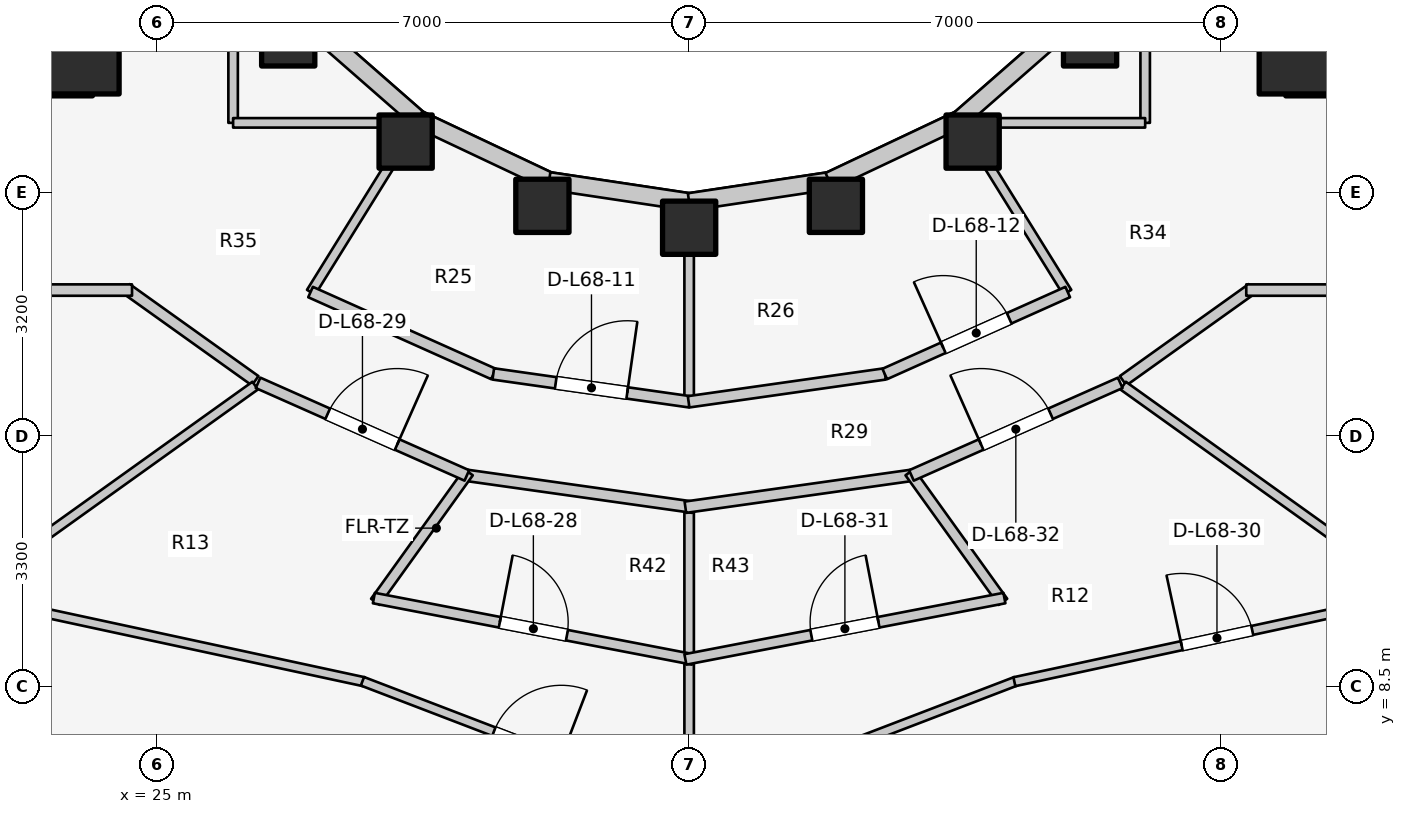
"""IFC4 building model, lengths in metres.
Left out: names, types, materials, properties, quantities, classifications, styles, units other than length and angle.
Written with IfcOpenShell. Run it as: python <this file> out.ifc"""

import sys

from ifc_helpers import new_model, si_unit, direction, frame, frame_2d, origin, origin_2d, place, context, subcontext, project, spatial, rectangle, extrude, element, fill, save


model = new_model("IFC4")
c1 = context("Model", 3, precision=1e-05, world=origin(), true_north=direction((0.0, 1.0)))
c2 = subcontext(c1, "Body", "Model", "MODEL_VIEW")
j1 = project(units=[si_unit("LENGTHUNIT", "METRE"), si_unit("PLANEANGLEUNIT", "RADIAN")], contexts=[c1])
p1 = place(None, origin())
s1 = spatial("IfcSite", under=j1, at=p1, CompositionType="ELEMENT")
p2 = place(p1, origin())
s2 = spatial("IfcBuilding", under=s1, at=p2, CompositionType="ELEMENT")
p3 = place(p2, frame((0.0, 0.0, 223.3)))
s3 = spatial("IfcBuildingStorey", under=s2, at=p3, CompositionType="ELEMENT", Elevation=223.3)
for number, where, z_axis, x_axis in (
    (1, (19.65, 16.55, 0.0), (0.0, 0.0, 1.0), (1.0, 0.0, 0.0)),
    (2, (39.85, 16.55, 0.0), (0.0, 0.0, 1.0), (1.0, 0.0, 0.0)),
):
    element("IfcWall", number, at=place(p3, frame(where, z_axis=z_axis, x_axis=x_axis)), inside=s3, PredefinedType="SHEAR", context=c2, shape_type="SweptSolid", body=[
        extrude(rectangle(XDim=4.5, YDim=0.55, at=frame_2d((2.25, 0.0))), origin(), (0.0, 0.0, 1.0), 3.1),
    ])
for number, where, z_axis, x_axis in (
    (3, (23.9, 16.9, 0.0), (0.0, 0.0, 1.0), (1.0, 0.0, 0.0)),
    (4, (40.1, 16.9, 0.0), (0.0, 0.0, 1.0), (1.0, 0.0, 0.0)),
):
    element("IfcColumn", number, at=place(p3, frame(where, z_axis=z_axis, x_axis=x_axis)), inside=s3, PredefinedType="COLUMN", context=c2, shape_type="SweptSolid", body=[
        extrude(rectangle(XDim=1.2, YDim=1.2, at=origin_2d()), origin(), (0.0, 0.0, 1.0), 3.1),
    ])
for number, where, z_axis, x_axis in (
    (5, (26.725, 17.018, 0.0), (0.0, 0.0, 1.0), (1.0, 0.0, 0.0)),
    (6, (28.27, 15.673, 0.0), (0.0, 0.0, 1.0), (1.0, 0.0, 0.0)),
    (7, (30.069, 14.828, 0.0), (0.0, 0.0, 1.0), (1.0, 0.0, 0.0)),
    (8, (32.0, 14.54, 0.0), (0.0, 0.0, 1.0), (1.0, 0.0, 0.0)),
    (9, (33.931, 14.828, 0.0), (0.0, 0.0, 1.0), (1.0, 0.0, 0.0)),
    (10, (35.73, 15.673, 0.0), (0.0, 0.0, 1.0), (1.0, 0.0, 0.0)),
    (11, (37.275, 17.018, 0.0), (0.0, 0.0, 1.0), (1.0, 0.0, 0.0)),
):
    element("IfcColumn", number, at=place(p3, frame(where, z_axis=z_axis, x_axis=x_axis)), inside=s3, PredefinedType="COLUMN", context=c2, shape_type="SweptSolid", body=[
        extrude(rectangle(XDim=0.7, YDim=0.7, at=origin_2d()), origin(), (0.0, 0.0, 1.0), 3.1),
    ])
p4 = place(p3, frame((26.965, 17.258, 0.0), z_axis=(0.0, 0.0, 1.0), x_axis=(0.752576694707, -0.658504607869, 0.0)))
e12 = element("IfcWall", 12, at=p4, inside=s3, PredefinedType="STANDARD", context=c2, shape_type="SweptSolid", body=[
    extrude(rectangle(XDim=1.959, YDim=0.23, at=frame_2d((0.98, 0.0))), origin(), (0.0, 0.0, 1.0), 2.16),
])
p5 = place(p3, frame((28.44, 15.968, 0.0), z_axis=(0.0, 0.0, 1.0), x_axis=(0.904179699603, -0.427152280606, 0.0)))
e13 = element("IfcWall", 13, at=p5, inside=s3, PredefinedType="STANDARD", context=c2, shape_type="SweptSolid", body=[
    extrude(rectangle(XDim=1.899, YDim=0.23, at=frame_2d((0.95, 0.0))), origin(), (0.0, 0.0, 1.0), 2.16),
])
for number, where, z_axis, x_axis in (
    (14, (30.157, 15.157, 0.0), (0.0, 0.0, 1.0), (0.989, -0.149, 0.0)),
    (15, (32.0, 14.88, 0.0), (0.0, 0.0, 1.0), (0.989, 0.149, 0.0)),
):
    element("IfcWall", number, at=place(p3, frame(where, z_axis=z_axis, x_axis=x_axis)), inside=s3, PredefinedType="STANDARD", context=c2, shape_type="SweptSolid", body=[
        extrude(rectangle(XDim=1.864, YDim=0.23, at=frame_2d((0.932, 0.0))), origin(), (0.0, 0.0, 1.0), 2.16),
    ])
p6 = place(p3, frame((33.843, 15.157, 0.0), z_axis=(0.0, 0.0, 1.0), x_axis=(0.904179699603, 0.427152280606, 0.0)))
e16 = element("IfcWall", 16, at=p6, inside=s3, PredefinedType="STANDARD", context=c2, shape_type="SweptSolid", body=[
    extrude(rectangle(XDim=1.899, YDim=0.23, at=frame_2d((0.95, 0.0))), origin(), (0.0, 0.0, 1.0), 2.16),
])
p7 = place(p3, frame((35.56, 15.968, 0.0), z_axis=(0.0, 0.0, 1.0), x_axis=(0.752576694707, 0.658504607869, 0.0)))
e17 = element("IfcWall", 17, at=p7, inside=s3, PredefinedType="STANDARD", context=c2, shape_type="SweptSolid", body=[
    extrude(rectangle(XDim=1.959, YDim=0.23, at=frame_2d((0.98, 0.0))), origin(), (0.0, 0.0, 1.0), 2.16),
])
p8 = place(p3, frame((28.45, 15.985, 0.0), z_axis=(0.0, 0.0, 1.0), x_axis=(-0.527527080983, -0.849538215049, 0.0)))
e18 = element("IfcWall", 18, at=p8, inside=s3, PredefinedType="PARTITIONING", context=c2, shape_type="SweptSolid", body=[
    extrude(rectangle(XDim=2.701, YDim=0.125, at=frame_2d((1.351, 0.0))), origin(), (0.0, 0.0, 1.0), 2.376),
])
p9 = place(p3, frame((32.0, 14.9, 0.0), z_axis=(0.0, 0.0, 1.0), x_axis=(0.0, -1.0, 0.0)))
e19 = element("IfcWall", 19, at=p9, inside=s3, PredefinedType="PARTITIONING", context=c2, shape_type="SweptSolid", body=[
    extrude(rectangle(XDim=2.65, YDim=0.125, at=frame_2d((1.325, 0.0))), origin(), (0.0, 0.0, 1.0), 2.376),
])
p10 = place(p3, frame((35.55, 15.985, 0.0), z_axis=(0.0, 0.0, 1.0), x_axis=(0.527527080983, -0.849538215049, 0.0)))
e20 = element("IfcWall", 20, at=p10, inside=s3, PredefinedType="PARTITIONING", context=c2, shape_type="SweptSolid", body=[
    extrude(rectangle(XDim=2.701, YDim=0.125, at=frame_2d((1.351, 0.0))), origin(), (0.0, 0.0, 1.0), 2.376),
])
p11 = place(p3, frame((27.019, 13.694, 0.0), z_axis=(0.0, 0.0, 1.0), x_axis=(0.912628408652, -0.408790151203, 0.0)))
e21 = element("IfcWall", 21, at=p11, inside=s3, PredefinedType="PARTITIONING", context=c2, shape_type="SweptSolid", body=[
    extrude(rectangle(XDim=2.638, YDim=0.15, at=frame_2d((1.319, 0.0))), origin(), (0.0, 0.0, 1.0), 2.376),
])
p12 = place(p3, frame((29.423, 12.617, 0.0), z_axis=(0.0, 0.0, 1.0), x_axis=(0.990078185178, -0.140517569133, 0.0)))
e22 = element("IfcWall", 22, at=p12, inside=s3, PredefinedType="PARTITIONING", context=c2, shape_type="SweptSolid", body=[
    extrude(rectangle(XDim=2.61, YDim=0.15, at=frame_2d((1.305, 0.0))), origin(), (0.0, 0.0, 1.0), 2.376),
])
p13 = place(p12, frame((0.83, 0.0, 0.0)))
e23 = element("IfcOpeningElement", 23, at=p13, cuts=e22, PredefinedType="OPENING", context=c2, shape_type="SweptSolid", body=[
    extrude(rectangle(XDim=0.95, YDim=2.1, at=frame_2d((0.475, 1.05))), frame((0.0, 0.085, 0.0), z_axis=(0.0, -1.0, 0.0), x_axis=(1.0, 0.0, 0.0)), (0.0, 0.0, 1.0), 0.17),
])
p14 = place(p3, frame((31.993, 12.25, 0.0), z_axis=(0.0, 0.0, 1.0), x_axis=(0.990078185178, 0.140517569133, 0.0)))
e24 = element("IfcWall", 24, at=p14, inside=s3, PredefinedType="PARTITIONING", context=c2, shape_type="SweptSolid", body=[
    extrude(rectangle(XDim=2.61, YDim=0.15, at=frame_2d((1.305, 0.0))), origin(), (0.0, 0.0, 1.0), 2.376),
])
p15 = place(p3, frame((34.573, 12.616, 0.0), z_axis=(0.0, 0.0, 1.0), x_axis=(0.912628408652, 0.408790151203, 0.0)))
e25 = element("IfcWall", 25, at=p15, inside=s3, PredefinedType="PARTITIONING", context=c2, shape_type="SweptSolid", body=[
    extrude(rectangle(XDim=2.638, YDim=0.15, at=frame_2d((1.319, 0.0))), origin(), (0.0, 0.0, 1.0), 2.376),
])
p16 = place(p15, frame((0.844, 0.0, 0.0)))
e26 = element("IfcOpeningElement", 26, at=p16, cuts=e25, PredefinedType="OPENING", context=c2, shape_type="SweptSolid", body=[
    extrude(rectangle(XDim=0.95, YDim=2.1, at=frame_2d((0.475, 1.05))), frame((0.0, 0.085, 0.0), z_axis=(0.0, -1.0, 0.0), x_axis=(1.0, 0.0, 0.0)), (0.0, 0.0, 1.0), 0.17),
])
p17 = place(p3, frame((26.0, 15.92, 0.0), z_axis=(0.0, 0.0, 1.0), x_axis=(0.0, 1.0, 0.0)))
e27 = element("IfcWall", 27, at=p17, inside=s3, PredefinedType="PARTITIONING", context=c2, shape_type="SweptSolid", body=[
    extrude(rectangle(XDim=4.28, YDim=0.125, at=frame_2d((2.14, 0.0))), origin(), (0.0, 0.0, 1.0), 2.232),
])
p18 = place(p3, frame((26.0, 15.92, 0.0), z_axis=(0.0, 0.0, 1.0), x_axis=(1.0, 0.0, 0.0)))
e28 = element("IfcWall", 28, at=p18, inside=s3, PredefinedType="PARTITIONING", context=c2, shape_type="SweptSolid", body=[
    extrude(rectangle(XDim=2.6, YDim=0.125, at=frame_2d((1.3, 0.0))), origin(), (0.0, 0.0, 1.0), 2.232),
])
p19 = place(p3, frame((38.0, 15.92, 0.0), z_axis=(0.0, 0.0, 1.0), x_axis=(0.0, 1.0, 0.0)))
e29 = element("IfcWall", 29, at=p19, inside=s3, PredefinedType="PARTITIONING", context=c2, shape_type="SweptSolid", body=[
    extrude(rectangle(XDim=4.28, YDim=0.125, at=frame_2d((2.14, 0.0))), origin(), (0.0, 0.0, 1.0), 2.232),
])
p20 = place(p3, frame((35.4, 15.92, 0.0), z_axis=(0.0, 0.0, 1.0), x_axis=(1.0, 0.0, 0.0)))
e30 = element("IfcWall", 30, at=p20, inside=s3, PredefinedType="PARTITIONING", context=c2, shape_type="SweptSolid", body=[
    extrude(rectangle(XDim=2.6, YDim=0.125, at=frame_2d((1.3, 0.0))), origin(), (0.0, 0.0, 1.0), 2.232),
])
p21 = place(p3, frame((26.29, 12.527, 0.0), z_axis=(0.0, 0.0, 1.0), x_axis=(-0.813780999276, 0.581171648669, 0.0)))
e31 = element("IfcWall", 31, at=p21, inside=s3, PredefinedType="PARTITIONING", context=c2, shape_type="SweptSolid", body=[
    extrude(rectangle(XDim=2.082, YDim=0.15, at=frame_2d((1.041, 0.0))), origin(), (0.0, 0.0, 1.0), 2.376),
])
p22 = place(p3, frame((17.15, 13.72, 0.0), z_axis=(0.0, 0.0, 1.0), x_axis=(1.0, 0.0, 0.0)))
e32 = element("IfcWall", 32, at=p22, inside=s3, PredefinedType="PARTITIONING", context=c2, shape_type="SweptSolid", body=[
    extrude(rectangle(XDim=7.52, YDim=0.15, at=frame_2d((3.76, 0.0))), origin(), (0.0, 0.0, 1.0), 2.376),
])
p23 = place(p22, frame((1.3, 0.0, 0.0)))
e33 = element("IfcOpeningElement", 33, at=p23, cuts=e32, PredefinedType="OPENING", context=c2, shape_type="SweptSolid", body=[
    extrude(rectangle(XDim=0.9, YDim=2.1, at=frame_2d((0.45, 1.05))), frame((0.0, 0.085, 0.0), z_axis=(0.0, -1.0, 0.0), x_axis=(1.0, 0.0, 0.0)), (0.0, 0.0, 1.0), 0.17),
])
p24 = place(p3, frame((37.71, 12.527, 0.0), z_axis=(0.0, 0.0, 1.0), x_axis=(0.813780999276, 0.581171648669, 0.0)))
e34 = element("IfcWall", 34, at=p24, inside=s3, PredefinedType="PARTITIONING", context=c2, shape_type="SweptSolid", body=[
    extrude(rectangle(XDim=2.082, YDim=0.15, at=frame_2d((1.041, 0.0))), origin(), (0.0, 0.0, 1.0), 2.376),
])
p25 = place(p3, frame((39.33, 13.72, 0.0), z_axis=(0.0, 0.0, 1.0), x_axis=(1.0, 0.0, 0.0)))
e35 = element("IfcWall", 35, at=p25, inside=s3, PredefinedType="PARTITIONING", context=c2, shape_type="SweptSolid", body=[
    extrude(rectangle(XDim=7.52, YDim=0.15, at=frame_2d((3.76, 0.0))), origin(), (0.0, 0.0, 1.0), 2.376),
])
p26 = place(p25, frame((5.22, 0.0, 0.0)))
e36 = element("IfcOpeningElement", 36, at=p26, cuts=e35, PredefinedType="OPENING", context=c2, shape_type="SweptSolid", body=[
    extrude(rectangle(XDim=0.9, YDim=2.1, at=frame_2d((0.45, 1.05))), frame((0.0, 0.085, 0.0), z_axis=(0.0, -1.0, 0.0), x_axis=(1.0, 0.0, 0.0)), (0.0, 0.0, 1.0), 0.17),
])
p27 = place(p3, frame((26.29, 12.463, 0.0), z_axis=(0.0, 0.0, 1.0), x_axis=(-0.813163816543, -0.582034885093, 0.0)))
e37 = element("IfcWall", 37, at=p27, inside=s3, PredefinedType="PARTITIONING", context=c2, shape_type="SweptSolid", body=[
    extrude(rectangle(XDim=6.955, YDim=0.125, at=frame_2d((3.477, 0.0))), origin(), (0.0, 0.0, 1.0), 2.376),
])
p28 = place(p3, frame((32.0, 10.815, 0.0), z_axis=(0.0, 0.0, 1.0), x_axis=(0.0, -1.0, 0.0)))
e38 = element("IfcWall", 38, at=p28, inside=s3, PredefinedType="PARTITIONING", context=c2, shape_type="SweptSolid", body=[
    extrude(rectangle(XDim=5.715, YDim=0.125, at=frame_2d((2.857, 0.0))), origin(), (0.0, 0.0, 1.0), 2.376),
])
p29 = place(p3, frame((37.71, 12.463, 0.0), z_axis=(0.0, 0.0, 1.0), x_axis=(0.813163816543, -0.582034885093, 0.0)))
e39 = element("IfcWall", 39, at=p29, inside=s3, PredefinedType="PARTITIONING", context=c2, shape_type="SweptSolid", body=[
    extrude(rectangle(XDim=6.955, YDim=0.125, at=frame_2d((3.477, 0.0))), origin(), (0.0, 0.0, 1.0), 2.376),
])
p30 = place(p3, frame((22.39, 9.717, 0.0), z_axis=(0.0, 0.0, 1.0), x_axis=(0.977534972695, -0.210773283785, 0.0)))
e40 = element("IfcWall", 40, at=p30, inside=s3, PredefinedType="MOVABLE", context=c2, shape_type="SweptSolid", body=[
    extrude(rectangle(XDim=5.453, YDim=0.12, at=frame_2d((2.727, 0.0))), origin(), (0.0, 0.0, 1.0), 2.376),
])
p31 = place(p3, frame((27.702, 8.573, 0.0), z_axis=(0.0, 0.0, 1.0), x_axis=(0.933766866443, -0.357881878744, 0.0)))
e41 = element("IfcWall", 41, at=p31, inside=s3, PredefinedType="MOVABLE", context=c2, shape_type="SweptSolid", body=[
    extrude(rectangle(XDim=4.653, YDim=0.12, at=frame_2d((2.327, 0.0))), origin(), (0.0, 0.0, 1.0), 2.376),
])
p32 = place(p31, frame((1.852, 0.0, 0.0)))
e42 = element("IfcOpeningElement", 42, at=p32, cuts=e41, PredefinedType="OPENING", context=c2, shape_type="SweptSolid", body=[
    extrude(rectangle(XDim=0.95, YDim=2.1, at=frame_2d((0.475, 1.05))), frame((0.0, 0.07, 0.0), z_axis=(0.0, -1.0, 0.0), x_axis=(1.0, 0.0, 0.0)), (0.0, 0.0, 1.0), 0.14),
])
p33 = place(p3, frame((29.018, 11.29, 0.0), z_axis=(0.0, 0.0, 1.0), x_axis=(0.990214091671, -0.13955662885, 0.0)))
e43 = element("IfcWall", 43, at=p33, inside=s3, PredefinedType="PARTITIONING", context=c2, shape_type="SweptSolid", body=[
    extrude(rectangle(XDim=3.062, YDim=0.15, at=frame_2d((1.531, 0.0))), origin(), (0.0, 0.0, 1.0), 2.376),
])
p34 = place(p3, frame((29.097, 11.324, 0.0), z_axis=(0.0, 0.0, 1.0), x_axis=(-0.583259891741, -0.812285601673, 0.0)))
e44 = element("IfcWall", 44, at=p34, inside=s3, PredefinedType="PLUMBINGWALL", context=c2, shape_type="SweptSolid", body=[
    extrude(rectangle(XDim=2.1, YDim=0.14, at=frame_2d((1.05, 0.0))), origin(), (0.0, 0.0, 1.0), 2.385),
])
p35 = place(p3, frame((27.852, 9.668, 0.0), z_axis=(0.0, 0.0, 1.0), x_axis=(0.98198484664, -0.188959680803, 0.0)))
e45 = element("IfcWall", 45, at=p35, inside=s3, PredefinedType="PLUMBINGWALL", context=c2, shape_type="SweptSolid", body=[
    extrude(rectangle(XDim=4.274, YDim=0.14, at=frame_2d((2.137, 0.0))), origin(), (0.0, 0.0, 1.0), 2.376),
])
p36 = place(p35, frame((1.687, 0.0, 0.0)))
e46 = element("IfcOpeningElement", 46, at=p36, cuts=e45, PredefinedType="OPENING", context=c2, shape_type="SweptSolid", body=[
    extrude(rectangle(XDim=0.9, YDim=2.1, at=frame_2d((0.45, 1.05))), frame((0.0, 0.08, 0.0), z_axis=(0.0, -1.0, 0.0), x_axis=(1.0, 0.0, 0.0)), (0.0, 0.0, 1.0), 0.16),
])
p37 = place(p3, frame((26.328, 12.499, 0.0), z_axis=(0.0, 0.0, 1.0), x_axis=(0.914139569865, -0.405399613724, 0.0)))
e47 = element("IfcWall", 47, at=p37, inside=s3, PredefinedType="PARTITIONING", context=c2, shape_type="SweptSolid", body=[
    extrude(rectangle(XDim=3.005, YDim=0.15, at=frame_2d((1.502, 0.0))), origin(), (0.0, 0.0, 1.0), 2.376),
])
p38 = place(p37, frame((1.002, 0.0, 0.0)))
e48 = element("IfcOpeningElement", 48, at=p38, cuts=e47, PredefinedType="OPENING", context=c2, shape_type="SweptSolid", body=[
    extrude(rectangle(XDim=1.0, YDim=2.1, at=frame_2d((0.5, 1.05))), frame((0.0, 0.085, 0.0), z_axis=(0.0, -1.0, 0.0), x_axis=(1.0, 0.0, 0.0)), (0.0, 0.0, 1.0), 0.17),
])
p39 = place(p3, frame((31.953, 6.908, 0.0), z_axis=(0.0, 0.0, 1.0), x_axis=(0.933766866443, 0.357881878744, 0.0)))
e49 = element("IfcWall", 49, at=p39, inside=s3, PredefinedType="MOVABLE", context=c2, shape_type="SweptSolid", body=[
    extrude(rectangle(XDim=4.653, YDim=0.12, at=frame_2d((2.327, 0.0))), origin(), (0.0, 0.0, 1.0), 2.376),
])
p40 = place(p3, frame((36.279, 8.567, 0.0), z_axis=(0.0, 0.0, 1.0), x_axis=(0.977534972695, 0.210773283785, 0.0)))
e50 = element("IfcWall", 50, at=p40, inside=s3, PredefinedType="MOVABLE", context=c2, shape_type="SweptSolid", body=[
    extrude(rectangle(XDim=5.453, YDim=0.12, at=frame_2d((2.727, 0.0))), origin(), (0.0, 0.0, 1.0), 2.376),
])
p41 = place(p40, frame((2.252, 0.0, 0.0)))
e51 = element("IfcOpeningElement", 51, at=p41, cuts=e50, PredefinedType="OPENING", context=c2, shape_type="SweptSolid", body=[
    extrude(rectangle(XDim=0.95, YDim=2.1, at=frame_2d((0.475, 1.05))), frame((0.0, 0.07, 0.0), z_axis=(0.0, -1.0, 0.0), x_axis=(1.0, 0.0, 0.0)), (0.0, 0.0, 1.0), 0.14),
])
p42 = place(p3, frame((31.95, 10.863, 0.0), z_axis=(0.0, 0.0, 1.0), x_axis=(0.990214091671, 0.13955662885, 0.0)))
e52 = element("IfcWall", 52, at=p42, inside=s3, PredefinedType="PARTITIONING", context=c2, shape_type="SweptSolid", body=[
    extrude(rectangle(XDim=3.062, YDim=0.15, at=frame_2d((1.531, 0.0))), origin(), (0.0, 0.0, 1.0), 2.376),
])
p43 = place(p3, frame((34.903, 11.324, 0.0), z_axis=(0.0, 0.0, 1.0), x_axis=(0.583259891741, -0.812285601673, 0.0)))
e53 = element("IfcWall", 53, at=p43, inside=s3, PredefinedType="PLUMBINGWALL", context=c2, shape_type="SweptSolid", body=[
    extrude(rectangle(XDim=2.1, YDim=0.14, at=frame_2d((1.05, 0.0))), origin(), (0.0, 0.0, 1.0), 2.385),
])
p44 = place(p3, frame((31.951, 8.861, 0.0), z_axis=(0.0, 0.0, 1.0), x_axis=(0.98198484664, 0.188959680803, 0.0)))
e54 = element("IfcWall", 54, at=p44, inside=s3, PredefinedType="PLUMBINGWALL", context=c2, shape_type="SweptSolid", body=[
    extrude(rectangle(XDim=4.274, YDim=0.14, at=frame_2d((2.137, 0.0))), origin(), (0.0, 0.0, 1.0), 2.376),
])
p45 = place(p44, frame((1.687, 0.0, 0.0)))
e55 = element("IfcOpeningElement", 55, at=p45, cuts=e54, PredefinedType="OPENING", context=c2, shape_type="SweptSolid", body=[
    extrude(rectangle(XDim=0.9, YDim=2.1, at=frame_2d((0.45, 1.05))), frame((0.0, 0.08, 0.0), z_axis=(0.0, -1.0, 0.0), x_axis=(1.0, 0.0, 0.0)), (0.0, 0.0, 1.0), 0.16),
])
p46 = place(p3, frame((34.925, 11.281, 0.0), z_axis=(0.0, 0.0, 1.0), x_axis=(0.914139569865, 0.405399613724, 0.0)))
e56 = element("IfcWall", 56, at=p46, inside=s3, PredefinedType="PARTITIONING", context=c2, shape_type="SweptSolid", body=[
    extrude(rectangle(XDim=3.005, YDim=0.15, at=frame_2d((1.502, 0.0))), origin(), (0.0, 0.0, 1.0), 2.376),
])
p47 = place(p46, frame((1.002, 0.0, 0.0)))
e57 = element("IfcOpeningElement", 57, at=p47, cuts=e56, PredefinedType="OPENING", context=c2, shape_type="SweptSolid", body=[
    extrude(rectangle(XDim=1.0, YDim=2.1, at=frame_2d((0.5, 1.05))), frame((0.0, 0.085, 0.0), z_axis=(0.0, -1.0, 0.0), x_axis=(1.0, 0.0, 0.0)), (0.0, 0.0, 1.0), 0.17),
])
p48 = place(p13, origin())
e58 = element("IfcDoor", 58, at=p48, inside=s3, OperationType="SINGLE_SWING_RIGHT", PredefinedType="DOOR", context=c2, shape_type="SweptSolid", body=[
    extrude(rectangle(XDim=0.95, YDim=2.1, at=frame_2d((0.475, 1.05))), frame((0.0, 0.025, 0.0), z_axis=(0.0, -1.0, 0.0), x_axis=(1.0, 0.0, 0.0)), (0.0, 0.0, 1.0), 0.05),
])
fill(e23, e58)
p49 = place(p16, origin())
e59 = element("IfcDoor", 59, at=p49, inside=s3, OperationType="SINGLE_SWING_LEFT", PredefinedType="DOOR", context=c2, shape_type="SweptSolid", body=[
    extrude(rectangle(XDim=0.95, YDim=2.1, at=frame_2d((0.475, 1.05))), frame((0.0, 0.025, 0.0), z_axis=(0.0, -1.0, 0.0), x_axis=(1.0, 0.0, 0.0)), (0.0, 0.0, 1.0), 0.05),
])
fill(e26, e59)
p50 = place(p32, origin())
e60 = element("IfcDoor", 60, at=p50, inside=s3, OperationType="SINGLE_SWING_RIGHT", PredefinedType="DOOR", context=c2, shape_type="SweptSolid", body=[
    extrude(rectangle(XDim=0.95, YDim=2.1, at=frame_2d((0.475, 1.05))), frame((0.0, 0.025, 0.0), z_axis=(0.0, -1.0, 0.0), x_axis=(1.0, 0.0, 0.0)), (0.0, 0.0, 1.0), 0.05),
])
fill(e42, e60)
p51 = place(p36, origin())
e61 = element("IfcDoor", 61, at=p51, inside=s3, OperationType="SINGLE_SWING_LEFT", PredefinedType="DOOR", context=c2, shape_type="SweptSolid", body=[
    extrude(rectangle(XDim=0.9, YDim=2.1, at=frame_2d((0.45, 1.05))), frame((0.0, 0.025, 0.0), z_axis=(0.0, -1.0, 0.0), x_axis=(1.0, 0.0, 0.0)), (0.0, 0.0, 1.0), 0.05),
])
fill(e46, e61)
p52 = place(p38, origin())
e62 = element("IfcDoor", 62, at=p52, inside=s3, OperationType="SINGLE_SWING_RIGHT", PredefinedType="DOOR", context=c2, shape_type="SweptSolid", body=[
    extrude(rectangle(XDim=1.0, YDim=2.1, at=frame_2d((0.5, 1.05))), frame((0.0, 0.025, 0.0), z_axis=(0.0, -1.0, 0.0), x_axis=(1.0, 0.0, 0.0)), (0.0, 0.0, 1.0), 0.05),
])
fill(e48, e62)
p53 = place(p41, origin())
e63 = element("IfcDoor", 63, at=p53, inside=s3, OperationType="SINGLE_SWING_LEFT", PredefinedType="DOOR", context=c2, shape_type="SweptSolid", body=[
    extrude(rectangle(XDim=0.95, YDim=2.1, at=frame_2d((0.475, 1.05))), frame((0.0, 0.025, 0.0), z_axis=(0.0, -1.0, 0.0), x_axis=(1.0, 0.0, 0.0)), (0.0, 0.0, 1.0), 0.05),
])
fill(e51, e63)
p54 = place(p45, origin())
e64 = element("IfcDoor", 64, at=p54, inside=s3, OperationType="SINGLE_SWING_RIGHT", PredefinedType="DOOR", context=c2, shape_type="SweptSolid", body=[
    extrude(rectangle(XDim=0.9, YDim=2.1, at=frame_2d((0.45, 1.05))), frame((0.0, 0.025, 0.0), z_axis=(0.0, -1.0, 0.0), x_axis=(1.0, 0.0, 0.0)), (0.0, 0.0, 1.0), 0.05),
])
fill(e55, e64)
p55 = place(p47, origin())
e65 = element("IfcDoor", 65, at=p55, inside=s3, OperationType="SINGLE_SWING_LEFT", PredefinedType="DOOR", context=c2, shape_type="SweptSolid", body=[
    extrude(rectangle(XDim=1.0, YDim=2.1, at=frame_2d((0.5, 1.05))), frame((0.0, 0.025, 0.0), z_axis=(0.0, -1.0, 0.0), x_axis=(1.0, 0.0, 0.0)), (0.0, 0.0, 1.0), 0.05),
])
fill(e57, e65)
save(model, sys.argv[1])
